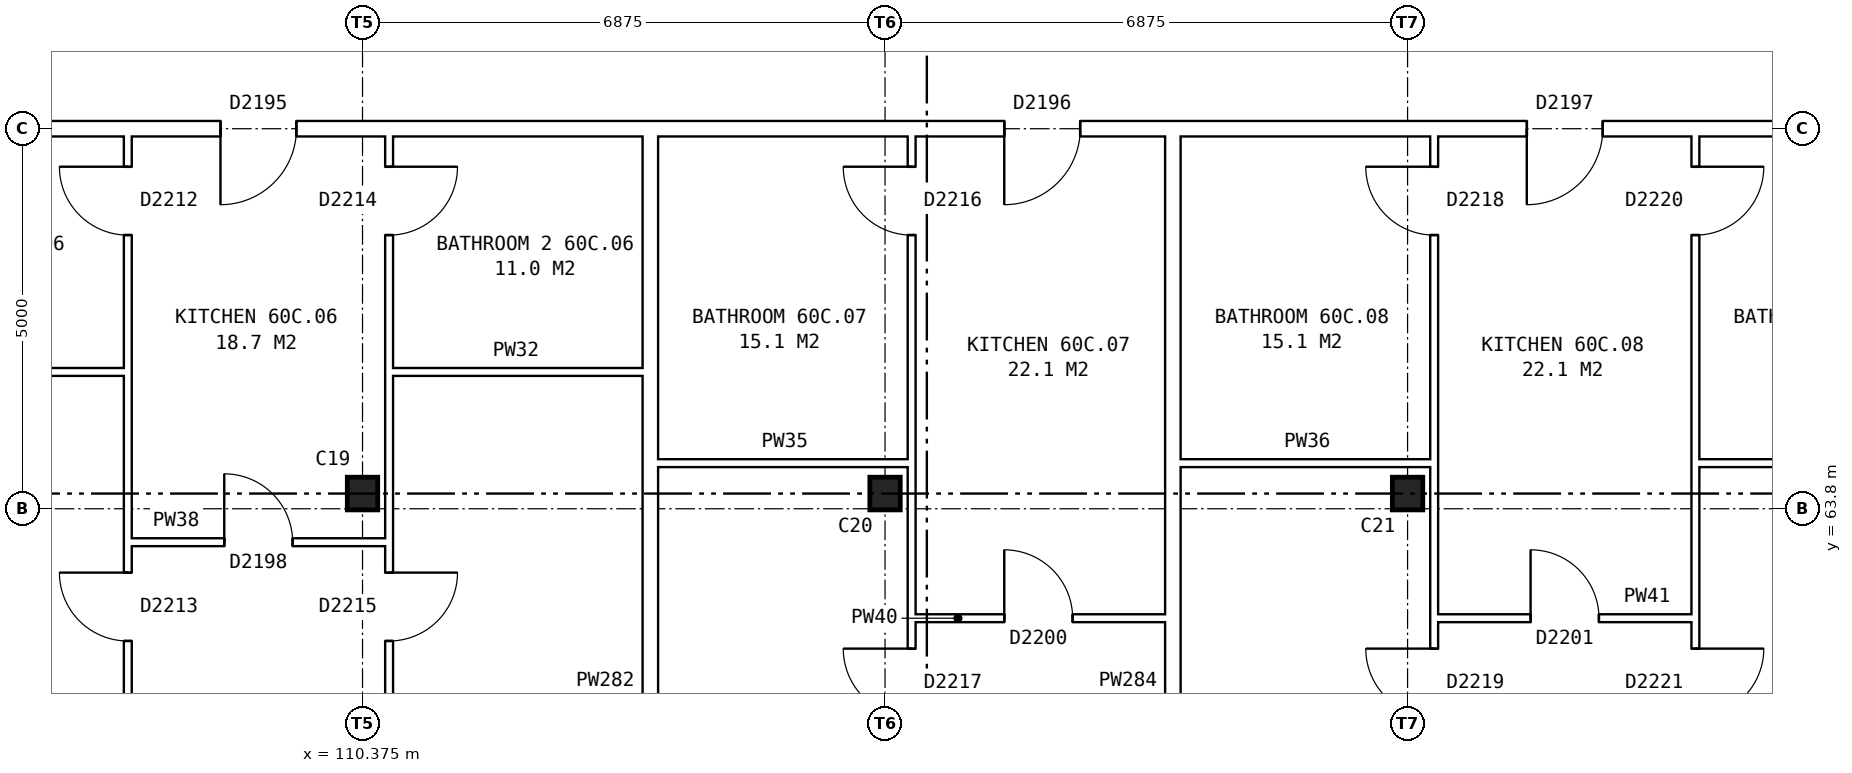
"""IFC4 building model, lengths in metres.
Left out: names, types, materials, properties, quantities, classifications, styles, units other than length and angle.
Written with IfcOpenShell. Run it as: python <this file> out.ifc"""

import sys

from ifc_helpers import new_model, si_unit, direction, frame, frame_2d, origin, origin_2d, place, context, subcontext, project, spatial, rectangle, i_section, extrude, element, fill, save


model = new_model("IFC4")
c1 = context("Model", 3, precision=1e-05, world=origin(), true_north=direction((0.0, 1.0)))
c2 = subcontext(c1, "Body", "Model", "MODEL_VIEW")
j1 = project(units=[si_unit("LENGTHUNIT", "METRE"), si_unit("PLANEANGLEUNIT", "RADIAN")], contexts=[c1])
p1 = place(None, origin())
s1 = spatial("IfcSite", under=j1, at=p1, CompositionType="ELEMENT")
p2 = place(p1, origin())
s2 = spatial("IfcBuilding", under=s1, at=p2, CompositionType="ELEMENT")
p3 = place(p2, frame((0.0, 0.0, 212.1)))
s3 = spatial("IfcBuildingStorey", under=s2, at=p3, CompositionType="ELEMENT", Elevation=212.1)
for number, where, z_axis, x_axis in (
    (1, (110.375, 64.0, 0.0), (0.0, 0.0, 1.0), (1.0, 0.0, 0.0)),
    (2, (117.25, 64.0, 0.0), (0.0, 0.0, 1.0), (1.0, 0.0, 0.0)),
    (3, (124.125, 64.0, 0.0), (0.0, 0.0, 1.0), (1.0, 0.0, 0.0)),
):
    element("IfcColumn", number, at=place(p3, frame(where, z_axis=z_axis, x_axis=x_axis)), inside=s3, PredefinedType="COLUMN", context=c2, shape_type="SweptSolid", body=[
        extrude(i_section(OverallWidth=0.4, OverallDepth=0.43, WebThickness=0.04, FlangeThickness=0.04, at=origin_2d()), origin(), (0.0, 0.0, 1.0), 2.85),
    ])
p4 = place(p3, frame((117.6, 62.36, 0.0), z_axis=(0.0, 0.0, 1.0), x_axis=(1.0, 0.0, 0.0)))
e4 = element("IfcWall", 4, at=p4, inside=s3, PredefinedType="PARTITIONING", context=c2, shape_type="SweptSolid", body=[
    extrude(rectangle(XDim=3.337, YDim=0.1, at=frame_2d((1.668, 0.0))), origin(), (0.0, 0.0, 1.0), 2.85),
])
p5 = place(p4, frame((1.219, 0.0, 0.0)))
e5 = element("IfcOpeningElement", 5, at=p5, cuts=e4, PredefinedType="OPENING", context=c2, shape_type="SweptSolid", body=[
    extrude(rectangle(XDim=0.9, YDim=2.1, at=frame_2d((0.45, 1.05))), frame((0.0, 0.06, 0.0), z_axis=(0.0, -1.0, 0.0), x_axis=(1.0, 0.0, 0.0)), (0.0, 0.0, 1.0), 0.12),
])
p6 = place(p3, frame((124.475, 62.36, 0.0), z_axis=(0.0, 0.0, 1.0), x_axis=(1.0, 0.0, 0.0)))
e6 = element("IfcWall", 6, at=p6, inside=s3, PredefinedType="PARTITIONING", context=c2, shape_type="SweptSolid", body=[
    extrude(rectangle(XDim=3.437, YDim=0.1, at=frame_2d((1.719, 0.0))), origin(), (0.0, 0.0, 1.0), 2.85),
])
p7 = place(p6, frame((1.269, 0.0, 0.0)))
e7 = element("IfcOpeningElement", 7, at=p7, cuts=e6, PredefinedType="OPENING", context=c2, shape_type="SweptSolid", body=[
    extrude(rectangle(XDim=0.9, YDim=2.1, at=frame_2d((0.45, 1.05))), frame((0.0, 0.06, 0.0), z_axis=(0.0, -1.0, 0.0), x_axis=(1.0, 0.0, 0.0)), (0.0, 0.0, 1.0), 0.12),
])
p8 = place(p3, frame((107.287, 63.36, 0.0), z_axis=(0.0, 0.0, 1.0), x_axis=(1.0, 0.0, 0.0)))
e8 = element("IfcWall", 8, at=p8, inside=s3, PredefinedType="PARTITIONING", context=c2, shape_type="SweptSolid", body=[
    extrude(rectangle(XDim=3.438, YDim=0.1, at=frame_2d((1.719, 0.0))), origin(), (0.0, 0.0, 1.0), 2.85),
])
p9 = place(p8, frame((1.269, 0.0, 0.0)))
e9 = element("IfcOpeningElement", 9, at=p9, cuts=e8, PredefinedType="OPENING", context=c2, shape_type="SweptSolid", body=[
    extrude(rectangle(XDim=0.9, YDim=2.1, at=frame_2d((0.45, 1.05))), frame((0.0, 0.06, 0.0), z_axis=(0.0, -1.0, 0.0), x_axis=(1.0, 0.0, 0.0)), (0.0, 0.0, 1.0), 0.12),
])
for number, where, z_axis, x_axis in (
    (10, (114.262, 64.4, 0.0), (0.0, 0.0, 1.0), (1.0, 0.0, 0.0)),
    (11, (121.137, 64.4, 0.0), (0.0, 0.0, 1.0), (1.0, 0.0, 0.0)),
):
    element("IfcWall", number, at=place(p3, frame(where, z_axis=z_axis, x_axis=x_axis)), inside=s3, PredefinedType="PARTITIONING", context=c2, shape_type="SweptSolid", body=[
        extrude(rectangle(XDim=3.338, YDim=0.1, at=frame_2d((1.669, 0.0))), origin(), (0.0, 0.0, 1.0), 2.85),
    ])
p10 = place(p3, frame((127.912, 64.4, 0.0), z_axis=(0.0, 0.0, 1.0), x_axis=(1.0, 0.0, 0.0)))
e12 = element("IfcWall", 12, at=p10, inside=s3, PredefinedType="PARTITIONING", context=c2, shape_type="SweptSolid", body=[
    extrude(rectangle(XDim=3.448, YDim=0.1, at=frame_2d((1.724, 0.0))), origin(), (0.0, 0.0, 1.0), 2.85),
])
p11 = place(p3, frame((100.412, 65.6, 0.0), z_axis=(0.0, 0.0, 1.0), x_axis=(1.0, 0.0, 0.0)))
e13 = element("IfcWall", 13, at=p11, inside=s3, PredefinedType="PARTITIONING", context=c2, shape_type="SweptSolid", body=[
    extrude(rectangle(XDim=6.875, YDim=0.1, at=frame_2d((3.438, 0.0))), origin(), (0.0, 0.0, 1.0), 2.85),
])
p12 = place(p3, frame((110.725, 65.6, 0.0), z_axis=(0.0, 0.0, 1.0), x_axis=(1.0, 0.0, 0.0)))
e14 = element("IfcWall", 14, at=p12, inside=s3, PredefinedType="PARTITIONING", context=c2, shape_type="SweptSolid", body=[
    extrude(rectangle(XDim=3.337, YDim=0.1, at=frame_2d((1.668, 0.0))), origin(), (0.0, 0.0, 1.0), 2.85),
])
p13 = place(p3, frame((75.64, 68.8, 0.0), z_axis=(0.0, 0.0, 1.0), x_axis=(1.0, 0.0, 0.0)))
e15 = element("IfcWall", 15, at=p13, inside=s3, PredefinedType="PARTITIONING", context=c2, shape_type="SweptSolid", body=[
    extrude(rectangle(XDim=55.72, YDim=0.2, at=frame_2d((27.86, 0.0))), origin(), (0.0, 0.0, 1.0), 2.85),
])
p14 = place(p13, frame((5.191, 0.0, 0.0)))
e16 = element("IfcOpeningElement", 16, at=p14, cuts=e15, PredefinedType="OPENING", context=c2, shape_type="SweptSolid", body=[
    extrude(rectangle(XDim=1.0, YDim=2.1, at=frame_2d((0.5, 1.05))), frame((0.0, 0.11, 0.0), z_axis=(0.0, -1.0, 0.0), x_axis=(1.0, 0.0, 0.0)), (0.0, 0.0, 1.0), 0.22),
])
p15 = place(p13, frame((15.678, 0.0, 0.0)))
e17 = element("IfcOpeningElement", 17, at=p15, cuts=e15, PredefinedType="OPENING", context=c2, shape_type="SweptSolid", body=[
    extrude(rectangle(XDim=1.0, YDim=2.1, at=frame_2d((0.5, 1.05))), frame((0.0, 0.11, 0.0), z_axis=(0.0, -1.0, 0.0), x_axis=(1.0, 0.0, 0.0)), (0.0, 0.0, 1.0), 0.22),
])
p16 = place(p13, frame((22.553, 0.0, 0.0)))
e18 = element("IfcOpeningElement", 18, at=p16, cuts=e15, PredefinedType="OPENING", context=c2, shape_type="SweptSolid", body=[
    extrude(rectangle(XDim=1.0, YDim=2.1, at=frame_2d((0.5, 1.05))), frame((0.0, 0.11, 0.0), z_axis=(0.0, -1.0, 0.0), x_axis=(1.0, 0.0, 0.0)), (0.0, 0.0, 1.0), 0.22),
])
p17 = place(p13, frame((32.866, 0.0, 0.0)))
e19 = element("IfcOpeningElement", 19, at=p17, cuts=e15, PredefinedType="OPENING", context=c2, shape_type="SweptSolid", body=[
    extrude(rectangle(XDim=1.0, YDim=2.1, at=frame_2d((0.5, 1.05))), frame((0.0, 0.11, 0.0), z_axis=(0.0, -1.0, 0.0), x_axis=(1.0, 0.0, 0.0)), (0.0, 0.0, 1.0), 0.22),
])
p18 = place(p13, frame((43.178, 0.0, 0.0)))
e20 = element("IfcOpeningElement", 20, at=p18, cuts=e15, PredefinedType="OPENING", context=c2, shape_type="SweptSolid", body=[
    extrude(rectangle(XDim=1.0, YDim=2.1, at=frame_2d((0.5, 1.05))), frame((0.0, 0.11, 0.0), z_axis=(0.0, -1.0, 0.0), x_axis=(1.0, 0.0, 0.0)), (0.0, 0.0, 1.0), 0.22),
])
p19 = place(p13, frame((50.053, 0.0, 0.0)))
e21 = element("IfcOpeningElement", 21, at=p19, cuts=e15, PredefinedType="OPENING", context=c2, shape_type="SweptSolid", body=[
    extrude(rectangle(XDim=1.0, YDim=2.1, at=frame_2d((0.5, 1.05))), frame((0.0, 0.11, 0.0), z_axis=(0.0, -1.0, 0.0), x_axis=(1.0, 0.0, 0.0)), (0.0, 0.0, 1.0), 0.22),
])
p20 = place(p3, frame((107.287, 54.36, 0.0), z_axis=(0.0, 0.0, 1.0), x_axis=(0.0, 1.0, 0.0)))
e22 = element("IfcWall", 22, at=p20, inside=s3, PredefinedType="PARTITIONING", context=c2, shape_type="SweptSolid", body=[
    extrude(rectangle(XDim=14.34, YDim=0.1, at=frame_2d((7.17, 0.0))), origin(), (0.0, 0.0, 1.0), 2.85),
])
p21 = place(p20, frame((7.7, 0.0, 0.0)))
e23 = element("IfcOpeningElement", 23, at=p21, cuts=e22, PredefinedType="OPENING", context=c2, shape_type="SweptSolid", body=[
    extrude(rectangle(XDim=0.9, YDim=2.1, at=frame_2d((0.45, 1.05))), frame((0.0, 0.06, 0.0), z_axis=(0.0, -1.0, 0.0), x_axis=(1.0, 0.0, 0.0)), (0.0, 0.0, 1.0), 0.12),
])
p22 = place(p20, frame((13.04, 0.0, 0.0)))
e24 = element("IfcOpeningElement", 24, at=p22, cuts=e22, PredefinedType="OPENING", context=c2, shape_type="SweptSolid", body=[
    extrude(rectangle(XDim=0.9, YDim=2.1, at=frame_2d((0.45, 1.05))), frame((0.0, 0.06, 0.0), z_axis=(0.0, -1.0, 0.0), x_axis=(1.0, 0.0, 0.0)), (0.0, 0.0, 1.0), 0.12),
])
p23 = place(p3, frame((110.725, 54.36, 0.0), z_axis=(0.0, 0.0, 1.0), x_axis=(0.0, 1.0, 0.0)))
e25 = element("IfcWall", 25, at=p23, inside=s3, PredefinedType="PARTITIONING", context=c2, shape_type="SweptSolid", body=[
    extrude(rectangle(XDim=14.34, YDim=0.1, at=frame_2d((7.17, 0.0))), origin(), (0.0, 0.0, 1.0), 2.85),
])
p24 = place(p23, frame((7.7, 0.0, 0.0)))
e26 = element("IfcOpeningElement", 26, at=p24, cuts=e25, PredefinedType="OPENING", context=c2, shape_type="SweptSolid", body=[
    extrude(rectangle(XDim=0.9, YDim=2.1, at=frame_2d((0.45, 1.05))), frame((0.0, 0.06, 0.0), z_axis=(0.0, -1.0, 0.0), x_axis=(1.0, 0.0, 0.0)), (0.0, 0.0, 1.0), 0.12),
])
p25 = place(p23, frame((13.04, 0.0, 0.0)))
e27 = element("IfcOpeningElement", 27, at=p25, cuts=e25, PredefinedType="OPENING", context=c2, shape_type="SweptSolid", body=[
    extrude(rectangle(XDim=0.9, YDim=2.1, at=frame_2d((0.45, 1.05))), frame((0.0, 0.06, 0.0), z_axis=(0.0, -1.0, 0.0), x_axis=(1.0, 0.0, 0.0)), (0.0, 0.0, 1.0), 0.12),
])
p26 = place(p3, frame((114.162, 54.36, 0.0), z_axis=(0.0, 0.0, 1.0), x_axis=(0.0, 1.0, 0.0)))
e28 = element("IfcWall", 28, at=p26, inside=s3, PredefinedType="PARTITIONING", context=c2, shape_type="SweptSolid", body=[
    extrude(rectangle(XDim=14.34, YDim=0.2, at=frame_2d((7.17, 0.0))), origin(), (0.0, 0.0, 1.0), 2.85),
])
p27 = place(p3, frame((117.6, 54.36, 0.0), z_axis=(0.0, 0.0, 1.0), x_axis=(0.0, 1.0, 0.0)))
e29 = element("IfcWall", 29, at=p27, inside=s3, PredefinedType="PARTITIONING", context=c2, shape_type="SweptSolid", body=[
    extrude(rectangle(XDim=14.34, YDim=0.1, at=frame_2d((7.17, 0.0))), origin(), (0.0, 0.0, 1.0), 2.85),
])
p28 = place(p27, frame((6.7, 0.0, 0.0)))
e30 = element("IfcOpeningElement", 30, at=p28, cuts=e29, PredefinedType="OPENING", context=c2, shape_type="SweptSolid", body=[
    extrude(rectangle(XDim=0.9, YDim=2.1, at=frame_2d((0.45, 1.05))), frame((0.0, 0.06, 0.0), z_axis=(0.0, -1.0, 0.0), x_axis=(1.0, 0.0, 0.0)), (0.0, 0.0, 1.0), 0.12),
])
p29 = place(p27, frame((13.04, 0.0, 0.0)))
e31 = element("IfcOpeningElement", 31, at=p29, cuts=e29, PredefinedType="OPENING", context=c2, shape_type="SweptSolid", body=[
    extrude(rectangle(XDim=0.9, YDim=2.1, at=frame_2d((0.45, 1.05))), frame((0.0, 0.06, 0.0), z_axis=(0.0, -1.0, 0.0), x_axis=(1.0, 0.0, 0.0)), (0.0, 0.0, 1.0), 0.12),
])
p30 = place(p3, frame((121.037, 54.36, 0.0), z_axis=(0.0, 0.0, 1.0), x_axis=(0.0, 1.0, 0.0)))
e32 = element("IfcWall", 32, at=p30, inside=s3, PredefinedType="PARTITIONING", context=c2, shape_type="SweptSolid", body=[
    extrude(rectangle(XDim=14.34, YDim=0.2, at=frame_2d((7.17, 0.0))), origin(), (0.0, 0.0, 1.0), 2.85),
])
p31 = place(p3, frame((124.475, 54.36, 0.0), z_axis=(0.0, 0.0, 1.0), x_axis=(0.0, 1.0, 0.0)))
e33 = element("IfcWall", 33, at=p31, inside=s3, PredefinedType="PARTITIONING", context=c2, shape_type="SweptSolid", body=[
    extrude(rectangle(XDim=14.34, YDim=0.1, at=frame_2d((7.17, 0.0))), origin(), (0.0, 0.0, 1.0), 2.85),
])
p32 = place(p31, frame((6.7, 0.0, 0.0)))
e34 = element("IfcOpeningElement", 34, at=p32, cuts=e33, PredefinedType="OPENING", context=c2, shape_type="SweptSolid", body=[
    extrude(rectangle(XDim=0.9, YDim=2.1, at=frame_2d((0.45, 1.05))), frame((0.0, 0.06, 0.0), z_axis=(0.0, -1.0, 0.0), x_axis=(1.0, 0.0, 0.0)), (0.0, 0.0, 1.0), 0.12),
])
p33 = place(p31, frame((13.04, 0.0, 0.0)))
e35 = element("IfcOpeningElement", 35, at=p33, cuts=e33, PredefinedType="OPENING", context=c2, shape_type="SweptSolid", body=[
    extrude(rectangle(XDim=0.9, YDim=2.1, at=frame_2d((0.45, 1.05))), frame((0.0, 0.06, 0.0), z_axis=(0.0, -1.0, 0.0), x_axis=(1.0, 0.0, 0.0)), (0.0, 0.0, 1.0), 0.12),
])
p34 = place(p3, frame((127.912, 54.36, 0.0), z_axis=(0.0, 0.0, 1.0), x_axis=(0.0, 1.0, 0.0)))
e36 = element("IfcWall", 36, at=p34, inside=s3, PredefinedType="PARTITIONING", context=c2, shape_type="SweptSolid", body=[
    extrude(rectangle(XDim=14.34, YDim=0.1, at=frame_2d((7.17, 0.0))), origin(), (0.0, 0.0, 1.0), 2.85),
])
p35 = place(p34, frame((6.7, 0.0, 0.0)))
e37 = element("IfcOpeningElement", 37, at=p35, cuts=e36, PredefinedType="OPENING", context=c2, shape_type="SweptSolid", body=[
    extrude(rectangle(XDim=0.9, YDim=2.1, at=frame_2d((0.45, 1.05))), frame((0.0, 0.06, 0.0), z_axis=(0.0, -1.0, 0.0), x_axis=(1.0, 0.0, 0.0)), (0.0, 0.0, 1.0), 0.12),
])
p36 = place(p34, frame((13.04, 0.0, 0.0)))
e38 = element("IfcOpeningElement", 38, at=p36, cuts=e36, PredefinedType="OPENING", context=c2, shape_type="SweptSolid", body=[
    extrude(rectangle(XDim=0.9, YDim=2.1, at=frame_2d((0.45, 1.05))), frame((0.0, 0.06, 0.0), z_axis=(0.0, -1.0, 0.0), x_axis=(1.0, 0.0, 0.0)), (0.0, 0.0, 1.0), 0.12),
])
p37 = place(p21, origin())
e39 = element("IfcDoor", 39, at=p37, inside=s3, OperationType="SINGLE_SWING_RIGHT", PredefinedType="DOOR", context=c2, shape_type="SweptSolid", body=[
    extrude(rectangle(XDim=0.9, YDim=2.1, at=frame_2d((0.45, 1.05))), frame((0.0, 0.025, 0.0), z_axis=(0.0, -1.0, 0.0), x_axis=(1.0, 0.0, 0.0)), (0.0, 0.0, 1.0), 0.05),
])
fill(e23, e39)
p38 = place(p24, frame((0.9, 0.0, 0.0), z_axis=(0.0, 0.0, 1.0), x_axis=(-1.0, 0.0, 0.0)))
e40 = element("IfcDoor", 40, at=p38, inside=s3, OperationType="SINGLE_SWING_LEFT", PredefinedType="DOOR", context=c2, shape_type="SweptSolid", body=[
    extrude(rectangle(XDim=0.9, YDim=2.1, at=frame_2d((0.45, 1.05))), frame((0.0, 0.025, 0.0), z_axis=(0.0, -1.0, 0.0), x_axis=(1.0, 0.0, 0.0)), (0.0, 0.0, 1.0), 0.05),
])
fill(e26, e40)
p39 = place(p17, frame((1.0, 0.0, 0.0), z_axis=(0.0, 0.0, 1.0), x_axis=(-1.0, 0.0, 0.0)))
e41 = element("IfcDoor", 41, at=p39, inside=s3, OperationType="SINGLE_SWING_RIGHT", PredefinedType="DOOR", context=c2, shape_type="SweptSolid", body=[
    extrude(rectangle(XDim=1.0, YDim=2.1, at=frame_2d((0.5, 1.05))), frame((0.0, 0.025, 0.0), z_axis=(0.0, -1.0, 0.0), x_axis=(1.0, 0.0, 0.0)), (0.0, 0.0, 1.0), 0.05),
])
fill(e19, e41)
p40 = place(p9, origin())
e42 = element("IfcDoor", 42, at=p40, inside=s3, OperationType="SINGLE_SWING_LEFT", PredefinedType="DOOR", context=c2, shape_type="SweptSolid", body=[
    extrude(rectangle(XDim=0.9, YDim=2.1, at=frame_2d((0.45, 1.05))), frame((0.0, 0.025, 0.0), z_axis=(0.0, -1.0, 0.0), x_axis=(1.0, 0.0, 0.0)), (0.0, 0.0, 1.0), 0.05),
])
fill(e9, e42)
p41 = place(p22, origin())
e43 = element("IfcDoor", 43, at=p41, inside=s3, OperationType="SINGLE_SWING_RIGHT", PredefinedType="DOOR", context=c2, shape_type="SweptSolid", body=[
    extrude(rectangle(XDim=0.9, YDim=2.1, at=frame_2d((0.45, 1.05))), frame((0.0, 0.025, 0.0), z_axis=(0.0, -1.0, 0.0), x_axis=(1.0, 0.0, 0.0)), (0.0, 0.0, 1.0), 0.05),
])
fill(e24, e43)
p42 = place(p25, frame((0.9, 0.0, 0.0), z_axis=(0.0, 0.0, 1.0), x_axis=(-1.0, 0.0, 0.0)))
e44 = element("IfcDoor", 44, at=p42, inside=s3, OperationType="SINGLE_SWING_LEFT", PredefinedType="DOOR", context=c2, shape_type="SweptSolid", body=[
    extrude(rectangle(XDim=0.9, YDim=2.1, at=frame_2d((0.45, 1.05))), frame((0.0, 0.025, 0.0), z_axis=(0.0, -1.0, 0.0), x_axis=(1.0, 0.0, 0.0)), (0.0, 0.0, 1.0), 0.05),
])
fill(e27, e44)
p43 = place(p28, origin())
e45 = element("IfcDoor", 45, at=p43, inside=s3, OperationType="SINGLE_SWING_RIGHT", PredefinedType="DOOR", context=c2, shape_type="SweptSolid", body=[
    extrude(rectangle(XDim=0.9, YDim=2.1, at=frame_2d((0.45, 1.05))), frame((0.0, 0.025, 0.0), z_axis=(0.0, -1.0, 0.0), x_axis=(1.0, 0.0, 0.0)), (0.0, 0.0, 1.0), 0.05),
])
fill(e30, e45)
p44 = place(p18, frame((1.0, 0.0, 0.0), z_axis=(0.0, 0.0, 1.0), x_axis=(-1.0, 0.0, 0.0)))
e46 = element("IfcDoor", 46, at=p44, inside=s3, OperationType="SINGLE_SWING_RIGHT", PredefinedType="DOOR", context=c2, shape_type="SweptSolid", body=[
    extrude(rectangle(XDim=1.0, YDim=2.1, at=frame_2d((0.5, 1.05))), frame((0.0, 0.025, 0.0), z_axis=(0.0, -1.0, 0.0), x_axis=(1.0, 0.0, 0.0)), (0.0, 0.0, 1.0), 0.05),
])
fill(e20, e46)
p45 = place(p5, origin())
e47 = element("IfcDoor", 47, at=p45, inside=s3, OperationType="SINGLE_SWING_LEFT", PredefinedType="DOOR", context=c2, shape_type="SweptSolid", body=[
    extrude(rectangle(XDim=0.9, YDim=2.1, at=frame_2d((0.45, 1.05))), frame((0.0, 0.025, 0.0), z_axis=(0.0, -1.0, 0.0), x_axis=(1.0, 0.0, 0.0)), (0.0, 0.0, 1.0), 0.05),
])
fill(e5, e47)
p46 = place(p29, origin())
e48 = element("IfcDoor", 48, at=p46, inside=s3, OperationType="SINGLE_SWING_RIGHT", PredefinedType="DOOR", context=c2, shape_type="SweptSolid", body=[
    extrude(rectangle(XDim=0.9, YDim=2.1, at=frame_2d((0.45, 1.05))), frame((0.0, 0.025, 0.0), z_axis=(0.0, -1.0, 0.0), x_axis=(1.0, 0.0, 0.0)), (0.0, 0.0, 1.0), 0.05),
])
fill(e31, e48)
p47 = place(p32, origin())
e49 = element("IfcDoor", 49, at=p47, inside=s3, OperationType="SINGLE_SWING_RIGHT", PredefinedType="DOOR", context=c2, shape_type="SweptSolid", body=[
    extrude(rectangle(XDim=0.9, YDim=2.1, at=frame_2d((0.45, 1.05))), frame((0.0, 0.025, 0.0), z_axis=(0.0, -1.0, 0.0), x_axis=(1.0, 0.0, 0.0)), (0.0, 0.0, 1.0), 0.05),
])
fill(e34, e49)
p48 = place(p35, frame((0.9, 0.0, 0.0), z_axis=(0.0, 0.0, 1.0), x_axis=(-1.0, 0.0, 0.0)))
e50 = element("IfcDoor", 50, at=p48, inside=s3, OperationType="SINGLE_SWING_LEFT", PredefinedType="DOOR", context=c2, shape_type="SweptSolid", body=[
    extrude(rectangle(XDim=0.9, YDim=2.1, at=frame_2d((0.45, 1.05))), frame((0.0, 0.025, 0.0), z_axis=(0.0, -1.0, 0.0), x_axis=(1.0, 0.0, 0.0)), (0.0, 0.0, 1.0), 0.05),
])
fill(e37, e50)
p49 = place(p19, frame((1.0, 0.0, 0.0), z_axis=(0.0, 0.0, 1.0), x_axis=(-1.0, 0.0, 0.0)))
e51 = element("IfcDoor", 51, at=p49, inside=s3, OperationType="SINGLE_SWING_RIGHT", PredefinedType="DOOR", context=c2, shape_type="SweptSolid", body=[
    extrude(rectangle(XDim=1.0, YDim=2.1, at=frame_2d((0.5, 1.05))), frame((0.0, 0.025, 0.0), z_axis=(0.0, -1.0, 0.0), x_axis=(1.0, 0.0, 0.0)), (0.0, 0.0, 1.0), 0.05),
])
fill(e21, e51)
p50 = place(p7, origin())
e52 = element("IfcDoor", 52, at=p50, inside=s3, OperationType="SINGLE_SWING_LEFT", PredefinedType="DOOR", context=c2, shape_type="SweptSolid", body=[
    extrude(rectangle(XDim=0.9, YDim=2.1, at=frame_2d((0.45, 1.05))), frame((0.0, 0.025, 0.0), z_axis=(0.0, -1.0, 0.0), x_axis=(1.0, 0.0, 0.0)), (0.0, 0.0, 1.0), 0.05),
])
fill(e7, e52)
p51 = place(p33, origin())
e53 = element("IfcDoor", 53, at=p51, inside=s3, OperationType="SINGLE_SWING_RIGHT", PredefinedType="DOOR", context=c2, shape_type="SweptSolid", body=[
    extrude(rectangle(XDim=0.9, YDim=2.1, at=frame_2d((0.45, 1.05))), frame((0.0, 0.025, 0.0), z_axis=(0.0, -1.0, 0.0), x_axis=(1.0, 0.0, 0.0)), (0.0, 0.0, 1.0), 0.05),
])
fill(e35, e53)
p52 = place(p36, frame((0.9, 0.0, 0.0), z_axis=(0.0, 0.0, 1.0), x_axis=(-1.0, 0.0, 0.0)))
e54 = element("IfcDoor", 54, at=p52, inside=s3, OperationType="SINGLE_SWING_LEFT", PredefinedType="DOOR", context=c2, shape_type="SweptSolid", body=[
    extrude(rectangle(XDim=0.9, YDim=2.1, at=frame_2d((0.45, 1.05))), frame((0.0, 0.025, 0.0), z_axis=(0.0, -1.0, 0.0), x_axis=(1.0, 0.0, 0.0)), (0.0, 0.0, 1.0), 0.05),
])
fill(e38, e54)
save(model, sys.argv[1])
